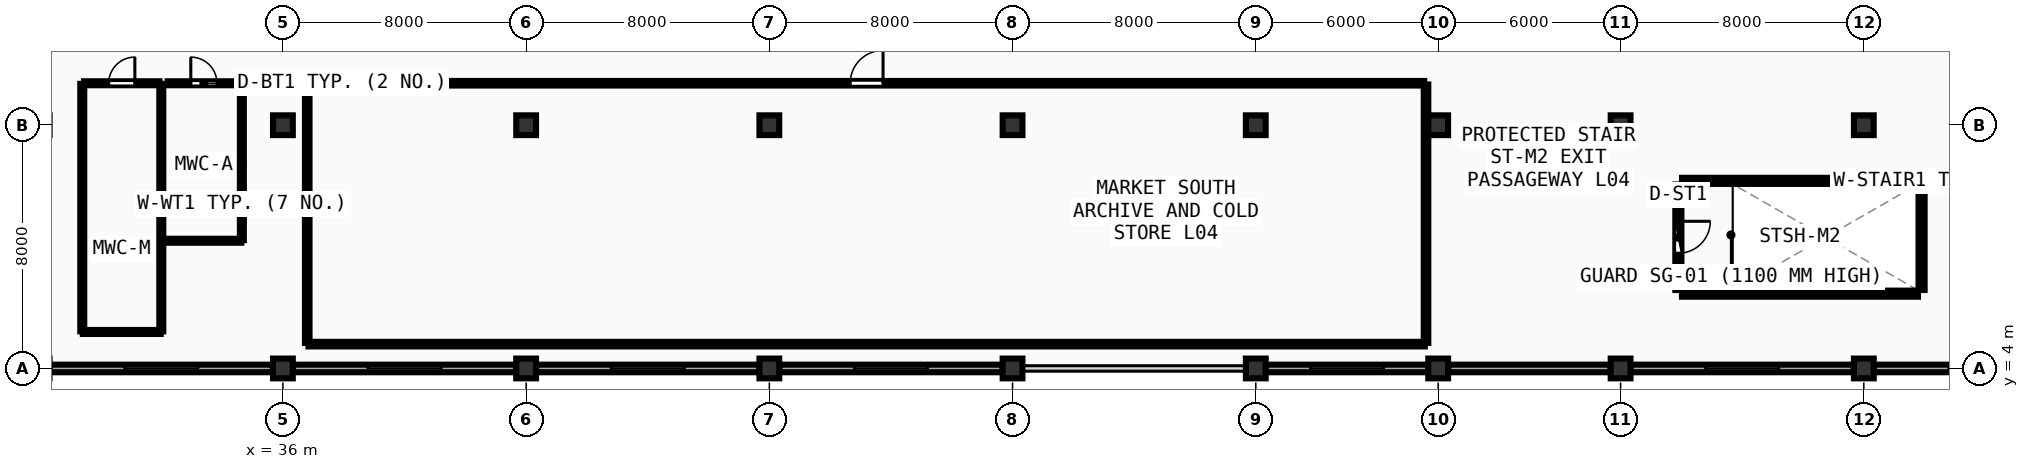
"""IFC4 building model, lengths in metres.
Left out: names, types, materials, properties, quantities, classifications, styles, units other than length and angle.
Written with IfcOpenShell. Run it as: python <this file> out.ifc"""

import sys

from ifc_helpers import new_model, si_unit, direction, frame, frame_2d, origin, origin_2d, place, context, subcontext, project, spatial, rectangle, extrude, element, fill, save


model = new_model("IFC4")
c1 = context("Model", 3, precision=1e-05, world=origin(), true_north=direction((0.0, 1.0)))
c2 = subcontext(c1, "Body", "Model", "MODEL_VIEW")
j1 = project(units=[si_unit("LENGTHUNIT", "METRE"), si_unit("PLANEANGLEUNIT", "RADIAN")], contexts=[c1])
p1 = place(None, origin())
s1 = spatial("IfcSite", under=j1, at=p1, CompositionType="ELEMENT")
p2 = place(p1, origin())
s2 = spatial("IfcBuilding", under=s1, at=p2, CompositionType="ELEMENT")
p3 = place(p2, frame((0.0, 0.0, 18.0)))
s3 = spatial("IfcBuildingStorey", under=s2, at=p3, CompositionType="ELEMENT", Elevation=18.0)
for number, where, z_axis, x_axis in (
    (1, (36.0, 4.0, 0.0), (0.0, 0.0, 1.0), (1.0, 0.0, 0.0)),
    (2, (36.0, 12.0, 0.0), (0.0, 0.0, 1.0), (1.0, 0.0, 0.0)),
    (3, (44.0, 4.0, 0.0), (0.0, 0.0, 1.0), (1.0, 0.0, 0.0)),
    (4, (44.0, 12.0, 0.0), (0.0, 0.0, 1.0), (1.0, 0.0, 0.0)),
    (5, (52.0, 4.0, 0.0), (0.0, 0.0, 1.0), (1.0, 0.0, 0.0)),
    (6, (52.0, 12.0, 0.0), (0.0, 0.0, 1.0), (1.0, 0.0, 0.0)),
    (7, (60.0, 4.0, 0.0), (0.0, 0.0, 1.0), (1.0, 0.0, 0.0)),
    (8, (60.0, 12.0, 0.0), (0.0, 0.0, 1.0), (1.0, 0.0, 0.0)),
    (9, (68.0, 4.0, 0.0), (0.0, 0.0, 1.0), (1.0, 0.0, 0.0)),
    (10, (68.0, 12.0, 0.0), (0.0, 0.0, 1.0), (1.0, 0.0, 0.0)),
    (11, (74.0, 4.0, 0.0), (0.0, 0.0, 1.0), (1.0, 0.0, 0.0)),
    (12, (74.0, 12.0, 0.0), (0.0, 0.0, 1.0), (1.0, 0.0, 0.0)),
    (13, (80.0, 4.0, 0.0), (0.0, 0.0, 1.0), (1.0, 0.0, 0.0)),
    (14, (80.0, 12.0, 0.0), (0.0, 0.0, 1.0), (1.0, 0.0, 0.0)),
    (15, (88.0, 4.0, 0.0), (0.0, 0.0, 1.0), (1.0, 0.0, 0.0)),
    (16, (88.0, 12.0, 0.0), (0.0, 0.0, 1.0), (1.0, 0.0, 0.0)),
):
    element("IfcColumn", number, at=place(p3, frame(where, z_axis=z_axis, x_axis=x_axis)), inside=s3, PredefinedType="COLUMN", context=c2, shape_type="SweptSolid", body=[
        extrude(rectangle(XDim=0.65, YDim=0.65, at=origin_2d()), origin(), (0.0, 0.0, 1.0), 4.5),
    ])
p4 = place(p3, frame((28.33, 4.0, 0.0), z_axis=(0.0, 0.0, 1.0), x_axis=(1.0, 0.0, 0.0)))
e17 = element("IfcWall", 17, at=p4, inside=s3, PredefinedType="SOLIDWALL", context=c2, shape_type="SweptSolid", body=[
    extrude(rectangle(XDim=7.34, YDim=0.25, at=frame_2d((3.67, 0.0))), origin(), (0.0, 0.0, 1.0), 3.44),
])
p5 = place(p4, frame((2.47, 0.0, 0.95)))
e18 = element("IfcOpeningElement", 18, at=p5, cuts=e17, PredefinedType="OPENING", context=c2, shape_type="SweptSolid", body=[
    extrude(rectangle(XDim=2.4, YDim=1.65, at=frame_2d((1.2, 0.825))), frame((0.0, 0.135, 0.0), z_axis=(0.0, -1.0, 0.0), x_axis=(1.0, 0.0, 0.0)), (0.0, 0.0, 1.0), 0.27),
])
p6 = place(p3, frame((36.33, 4.0, 0.0), z_axis=(0.0, 0.0, 1.0), x_axis=(1.0, 0.0, 0.0)))
e19 = element("IfcWall", 19, at=p6, inside=s3, PredefinedType="SOLIDWALL", context=c2, shape_type="SweptSolid", body=[
    extrude(rectangle(XDim=7.34, YDim=0.25, at=frame_2d((3.67, 0.0))), origin(), (0.0, 0.0, 1.0), 3.44),
])
p7 = place(p6, frame((2.47, 0.0, 0.95)))
e20 = element("IfcOpeningElement", 20, at=p7, cuts=e19, PredefinedType="OPENING", context=c2, shape_type="SweptSolid", body=[
    extrude(rectangle(XDim=2.4, YDim=1.65, at=frame_2d((1.2, 0.825))), frame((0.0, 0.135, 0.0), z_axis=(0.0, -1.0, 0.0), x_axis=(1.0, 0.0, 0.0)), (0.0, 0.0, 1.0), 0.27),
])
p8 = place(p3, frame((44.33, 4.0, 0.0), z_axis=(0.0, 0.0, 1.0), x_axis=(1.0, 0.0, 0.0)))
e21 = element("IfcWall", 21, at=p8, inside=s3, PredefinedType="SOLIDWALL", context=c2, shape_type="SweptSolid", body=[
    extrude(rectangle(XDim=7.34, YDim=0.25, at=frame_2d((3.67, 0.0))), origin(), (0.0, 0.0, 1.0), 3.44),
])
p9 = place(p8, frame((2.47, 0.0, 0.95)))
e22 = element("IfcOpeningElement", 22, at=p9, cuts=e21, PredefinedType="OPENING", context=c2, shape_type="SweptSolid", body=[
    extrude(rectangle(XDim=2.4, YDim=1.65, at=frame_2d((1.2, 0.825))), frame((0.0, 0.135, 0.0), z_axis=(0.0, -1.0, 0.0), x_axis=(1.0, 0.0, 0.0)), (0.0, 0.0, 1.0), 0.27),
])
p10 = place(p3, frame((52.33, 4.0, 0.0), z_axis=(0.0, 0.0, 1.0), x_axis=(1.0, 0.0, 0.0)))
e23 = element("IfcWall", 23, at=p10, inside=s3, PredefinedType="SOLIDWALL", context=c2, shape_type="SweptSolid", body=[
    extrude(rectangle(XDim=7.34, YDim=0.25, at=frame_2d((3.67, 0.0))), origin(), (0.0, 0.0, 1.0), 3.44),
])
p11 = place(p10, frame((2.47, 0.0, 0.95)))
e24 = element("IfcOpeningElement", 24, at=p11, cuts=e23, PredefinedType="OPENING", context=c2, shape_type="SweptSolid", body=[
    extrude(rectangle(XDim=2.4, YDim=1.65, at=frame_2d((1.2, 0.825))), frame((0.0, 0.135, 0.0), z_axis=(0.0, -1.0, 0.0), x_axis=(1.0, 0.0, 0.0)), (0.0, 0.0, 1.0), 0.27),
])
p12 = place(p3, frame((68.33, 4.0, 0.0), z_axis=(0.0, 0.0, 1.0), x_axis=(1.0, 0.0, 0.0)))
e25 = element("IfcWall", 25, at=p12, inside=s3, PredefinedType="SOLIDWALL", context=c2, shape_type="SweptSolid", body=[
    extrude(rectangle(XDim=5.34, YDim=0.25, at=frame_2d((2.67, 0.0))), origin(), (0.0, 0.0, 1.0), 3.44),
])
p13 = place(p12, frame((1.47, 0.0, 0.95)))
e26 = element("IfcOpeningElement", 26, at=p13, cuts=e25, PredefinedType="OPENING", context=c2, shape_type="SweptSolid", body=[
    extrude(rectangle(XDim=2.4, YDim=1.65, at=frame_2d((1.2, 0.825))), frame((0.0, 0.135, 0.0), z_axis=(0.0, -1.0, 0.0), x_axis=(1.0, 0.0, 0.0)), (0.0, 0.0, 1.0), 0.27),
])
p14 = place(p3, frame((74.33, 4.0, 0.0), z_axis=(0.0, 0.0, 1.0), x_axis=(1.0, 0.0, 0.0)))
e27 = element("IfcWall", 27, at=p14, inside=s3, PredefinedType="SOLIDWALL", context=c2, shape_type="SweptSolid", body=[
    extrude(rectangle(XDim=5.34, YDim=0.25, at=frame_2d((2.67, 0.0))), origin(), (0.0, 0.0, 1.0), 3.44),
])
p15 = place(p3, frame((80.33, 4.0, 0.0), z_axis=(0.0, 0.0, 1.0), x_axis=(1.0, 0.0, 0.0)))
e28 = element("IfcWall", 28, at=p15, inside=s3, PredefinedType="SOLIDWALL", context=c2, shape_type="SweptSolid", body=[
    extrude(rectangle(XDim=7.34, YDim=0.25, at=frame_2d((3.67, 0.0))), origin(), (0.0, 0.0, 1.0), 3.44),
])
p16 = place(p15, frame((2.47, 0.0, 0.95)))
e29 = element("IfcOpeningElement", 29, at=p16, cuts=e28, PredefinedType="OPENING", context=c2, shape_type="SweptSolid", body=[
    extrude(rectangle(XDim=2.4, YDim=1.65, at=frame_2d((1.2, 0.825))), frame((0.0, 0.135, 0.0), z_axis=(0.0, -1.0, 0.0), x_axis=(1.0, 0.0, 0.0)), (0.0, 0.0, 1.0), 0.27),
])
p17 = place(p3, frame((88.33, 4.0, 0.0), z_axis=(0.0, 0.0, 1.0), x_axis=(1.0, 0.0, 0.0)))
e30 = element("IfcWall", 30, at=p17, inside=s3, PredefinedType="SOLIDWALL", context=c2, shape_type="SweptSolid", body=[
    extrude(rectangle(XDim=7.34, YDim=0.25, at=frame_2d((3.67, 0.0))), origin(), (0.0, 0.0, 1.0), 3.44),
])
p18 = place(p17, frame((2.47, 0.0, 0.95)))
e31 = element("IfcOpeningElement", 31, at=p18, cuts=e30, PredefinedType="OPENING", context=c2, shape_type="SweptSolid", body=[
    extrude(rectangle(XDim=2.4, YDim=1.65, at=frame_2d((1.2, 0.825))), frame((0.0, 0.135, 0.0), z_axis=(0.0, -1.0, 0.0), x_axis=(1.0, 0.0, 0.0)), (0.0, 0.0, 1.0), 0.27),
])
p19 = place(p3, frame((82.02, 6.46, 0.0), z_axis=(0.0, 0.0, 1.0), x_axis=(1.0, 0.0, 0.0)))
e32 = element("IfcWall", 32, at=p19, inside=s3, PredefinedType="SHEAR", context=c2, shape_type="SweptSolid", body=[
    extrude(rectangle(XDim=7.76, YDim=0.2, at=frame_2d((3.88, 0.0))), origin(), (0.0, 0.0, 1.0), 4.26),
])
p20 = place(p3, frame((89.9, 6.58, 0.0), z_axis=(0.0, 0.0, 1.0), x_axis=(0.0, 1.0, 0.0)))
e33 = element("IfcWall", 33, at=p20, inside=s3, PredefinedType="SHEAR", context=c2, shape_type="SweptSolid", body=[
    extrude(rectangle(XDim=3.47, YDim=0.2, at=frame_2d((1.735, 0.0))), origin(), (0.0, 0.0, 1.0), 4.26),
])
p21 = place(p3, frame((89.78, 10.17, 0.0), z_axis=(0.0, 0.0, 1.0), x_axis=(-1.0, 0.0, 0.0)))
e34 = element("IfcWall", 34, at=p21, inside=s3, PredefinedType="SHEAR", context=c2, shape_type="SweptSolid", body=[
    extrude(rectangle(XDim=7.76, YDim=0.2, at=frame_2d((3.88, 0.0))), origin(), (0.0, 0.0, 1.0), 4.26),
])
p22 = place(p3, frame((81.9, 10.05, 0.0), z_axis=(0.0, 0.0, 1.0), x_axis=(0.0, -1.0, 0.0)))
e35 = element("IfcWall", 35, at=p22, inside=s3, PredefinedType="SHEAR", context=c2, shape_type="SweptSolid", body=[
    extrude(rectangle(XDim=3.47, YDim=0.2, at=frame_2d((1.735, 0.0))), origin(), (0.0, 0.0, 1.0), 4.26),
])
p23 = place(p22, frame((1.21, 0.0, 0.0)))
e36 = element("IfcOpeningElement", 36, at=p23, cuts=e35, PredefinedType="OPENING", context=c2, shape_type="SweptSolid", body=[
    extrude(rectangle(XDim=1.05, YDim=2.1, at=frame_2d((0.525, 1.05))), frame((0.0, 0.11, 0.0), z_axis=(0.0, -1.0, 0.0), x_axis=(1.0, 0.0, 0.0)), (0.0, 0.0, 1.0), 0.22),
])
p24 = place(p3, frame((29.46, 13.38, 0.0), z_axis=(0.0, 0.0, 1.0), x_axis=(1.0, 0.0, 0.0)))
e37 = element("IfcWall", 37, at=p24, inside=s3, PredefinedType="PLUMBINGWALL", context=c2, shape_type="SweptSolid", body=[
    extrude(rectangle(XDim=2.48, YDim=0.13, at=frame_2d((1.24, 0.0))), origin(), (0.0, 0.0, 1.0), 4.23),
])
p25 = place(p24, frame((0.81, 0.0, 0.0)))
e38 = element("IfcOpeningElement", 38, at=p25, cuts=e37, PredefinedType="OPENING", context=c2, shape_type="SweptSolid", body=[
    extrude(rectangle(XDim=0.86, YDim=2.05, at=frame_2d((0.43, 1.025))), frame((0.0, 0.075, 0.0), z_axis=(0.0, -1.0, 0.0), x_axis=(1.0, 0.0, 0.0)), (0.0, 0.0, 1.0), 0.15),
])
p26 = place(p3, frame((32.21, 13.38, 0.0), z_axis=(0.0, 0.0, 1.0), x_axis=(1.0, 0.0, 0.0)))
e39 = element("IfcWall", 39, at=p26, inside=s3, PredefinedType="PLUMBINGWALL", context=c2, shape_type="SweptSolid", body=[
    extrude(rectangle(XDim=2.38, YDim=0.13, at=frame_2d((1.19, 0.0))), origin(), (0.0, 0.0, 1.0), 4.23),
])
p27 = place(p26, frame((0.76, 0.0, 0.0)))
e40 = element("IfcOpeningElement", 40, at=p27, cuts=e39, PredefinedType="OPENING", context=c2, shape_type="SweptSolid", body=[
    extrude(rectangle(XDim=0.86, YDim=2.05, at=frame_2d((0.43, 1.025))), frame((0.0, 0.075, 0.0), z_axis=(0.0, -1.0, 0.0), x_axis=(1.0, 0.0, 0.0)), (0.0, 0.0, 1.0), 0.15),
])
p28 = place(p3, frame((36.86, 13.38, 0.0), z_axis=(0.0, 0.0, 1.0), x_axis=(1.0, 0.0, 0.0)))
e41 = element("IfcWall", 41, at=p28, inside=s3, PredefinedType="PARTITIONING", context=c2, shape_type="SweptSolid", body=[
    extrude(rectangle(XDim=36.68, YDim=0.15, at=frame_2d((18.34, 0.0))), origin(), (0.0, 0.0, 1.0), 3.445),
])
p29 = place(p28, frame((17.8, 0.0, 0.0)))
e42 = element("IfcOpeningElement", 42, at=p29, cuts=e41, PredefinedType="OPENING", context=c2, shape_type="SweptSolid", body=[
    extrude(rectangle(XDim=1.08, YDim=2.1, at=frame_2d((0.54, 1.05))), frame((0.0, 0.085, 0.0), z_axis=(0.0, -1.0, 0.0), x_axis=(1.0, 0.0, 0.0)), (0.0, 0.0, 1.0), 0.17),
])
p30 = place(p3, frame((29.42, 5.2, 0.0), z_axis=(0.0, 0.0, 1.0), x_axis=(1.0, 0.0, 0.0)))
e43 = element("IfcWall", 43, at=p30, inside=s3, PredefinedType="PLUMBINGWALL", context=c2, shape_type="SweptSolid", body=[
    extrude(rectangle(XDim=2.56, YDim=0.13, at=frame_2d((1.28, 0.0))), origin(), (0.0, 0.0, 1.0), 4.23),
])
for number, where, z_axis, x_axis in (
    (44, (32.0, 5.22, 0.0), (0.0, 0.0, 1.0), (0.0, 1.0, 0.0)),
    (45, (29.4, 13.36, 0.0), (0.0, 0.0, 1.0), (0.0, -1.0, 0.0)),
):
    element("IfcWall", number, at=place(p3, frame(where, z_axis=z_axis, x_axis=x_axis)), inside=s3, PredefinedType="PLUMBINGWALL", context=c2, shape_type="SweptSolid", body=[
        extrude(rectangle(XDim=8.14, YDim=0.13, at=frame_2d((4.07, 0.0))), origin(), (0.0, 0.0, 1.0), 3.445),
    ])
p31 = place(p3, frame((32.17, 8.2, 0.0), z_axis=(0.0, 0.0, 1.0), x_axis=(1.0, 0.0, 0.0)))
e46 = element("IfcWall", 46, at=p31, inside=s3, PredefinedType="PLUMBINGWALL", context=c2, shape_type="SweptSolid", body=[
    extrude(rectangle(XDim=2.46, YDim=0.13, at=frame_2d((1.23, 0.0))), origin(), (0.0, 0.0, 1.0), 4.23),
])
p32 = place(p3, frame((34.65, 8.22, 0.0), z_axis=(0.0, 0.0, 1.0), x_axis=(0.0, 1.0, 0.0)))
e47 = element("IfcWall", 47, at=p32, inside=s3, PredefinedType="PLUMBINGWALL", context=c2, shape_type="SweptSolid", body=[
    extrude(rectangle(XDim=5.14, YDim=0.13, at=frame_2d((2.57, 0.0))), origin(), (0.0, 0.0, 1.0), 3.445),
])
p33 = place(p3, frame((36.84, 4.8, 0.0), z_axis=(0.0, 0.0, 1.0), x_axis=(1.0, 0.0, 0.0)))
e48 = element("IfcWall", 48, at=p33, inside=s3, PredefinedType="PARTITIONING", context=c2, shape_type="SweptSolid", body=[
    extrude(rectangle(XDim=36.72, YDim=0.15, at=frame_2d((18.36, 0.0))), origin(), (0.0, 0.0, 1.0), 3.445),
])
for number, where, z_axis, x_axis in (
    (49, (73.6, 4.84, 0.0), (0.0, 0.0, 1.0), (0.0, 1.0, 0.0)),
    (50, (36.8, 13.34, 0.0), (0.0, 0.0, 1.0), (0.0, -1.0, 0.0)),
):
    element("IfcWall", number, at=place(p3, frame(where, z_axis=z_axis, x_axis=x_axis)), inside=s3, PredefinedType="PARTITIONING", context=c2, shape_type="SweptSolid", body=[
        extrude(rectangle(XDim=8.5, YDim=0.15, at=frame_2d((4.25, 0.0))), origin(), (0.0, 0.0, 1.0), 3.445),
    ])
p34 = place(p5, origin())
e51 = element("IfcWindow", 51, at=p34, inside=s3, PartitioningType="SINGLE_PANEL", PredefinedType="WINDOW", context=c2, shape_type="SweptSolid", body=[
    extrude(rectangle(XDim=2.4, YDim=1.65, at=frame_2d((1.2, 0.825))), frame((0.0, 0.03, 0.0), z_axis=(0.0, -1.0, 0.0), x_axis=(1.0, 0.0, 0.0)), (0.0, 0.0, 1.0), 0.06),
])
fill(e18, e51)
p35 = place(p7, origin())
e52 = element("IfcWindow", 52, at=p35, inside=s3, PartitioningType="SINGLE_PANEL", PredefinedType="WINDOW", context=c2, shape_type="SweptSolid", body=[
    extrude(rectangle(XDim=2.4, YDim=1.65, at=frame_2d((1.2, 0.825))), frame((0.0, 0.03, 0.0), z_axis=(0.0, -1.0, 0.0), x_axis=(1.0, 0.0, 0.0)), (0.0, 0.0, 1.0), 0.06),
])
fill(e20, e52)
p36 = place(p9, origin())
e53 = element("IfcWindow", 53, at=p36, inside=s3, PartitioningType="SINGLE_PANEL", PredefinedType="WINDOW", context=c2, shape_type="SweptSolid", body=[
    extrude(rectangle(XDim=2.4, YDim=1.65, at=frame_2d((1.2, 0.825))), frame((0.0, 0.03, 0.0), z_axis=(0.0, -1.0, 0.0), x_axis=(1.0, 0.0, 0.0)), (0.0, 0.0, 1.0), 0.06),
])
fill(e22, e53)
p37 = place(p11, origin())
e54 = element("IfcWindow", 54, at=p37, inside=s3, PartitioningType="SINGLE_PANEL", PredefinedType="WINDOW", context=c2, shape_type="SweptSolid", body=[
    extrude(rectangle(XDim=2.4, YDim=1.65, at=frame_2d((1.2, 0.825))), frame((0.0, 0.03, 0.0), z_axis=(0.0, -1.0, 0.0), x_axis=(1.0, 0.0, 0.0)), (0.0, 0.0, 1.0), 0.06),
])
fill(e24, e54)
p38 = place(p13, origin())
e55 = element("IfcWindow", 55, at=p38, inside=s3, PartitioningType="SINGLE_PANEL", PredefinedType="WINDOW", context=c2, shape_type="SweptSolid", body=[
    extrude(rectangle(XDim=2.4, YDim=1.65, at=frame_2d((1.2, 0.825))), frame((0.0, 0.03, 0.0), z_axis=(0.0, -1.0, 0.0), x_axis=(1.0, 0.0, 0.0)), (0.0, 0.0, 1.0), 0.06),
])
fill(e26, e55)
p39 = place(p16, origin())
e56 = element("IfcWindow", 56, at=p39, inside=s3, PartitioningType="SINGLE_PANEL", PredefinedType="WINDOW", context=c2, shape_type="SweptSolid", body=[
    extrude(rectangle(XDim=2.4, YDim=1.65, at=frame_2d((1.2, 0.825))), frame((0.0, 0.03, 0.0), z_axis=(0.0, -1.0, 0.0), x_axis=(1.0, 0.0, 0.0)), (0.0, 0.0, 1.0), 0.06),
])
fill(e29, e56)
p40 = place(p23, origin())
e57 = element("IfcDoor", 57, at=p40, inside=s3, OperationType="SINGLE_SWING_LEFT", PredefinedType="DOOR", context=c2, shape_type="SweptSolid", body=[
    extrude(rectangle(XDim=1.05, YDim=2.1, at=frame_2d((0.525, 1.05))), frame((0.0, 0.025, 0.0), z_axis=(0.0, -1.0, 0.0), x_axis=(1.0, 0.0, 0.0)), (0.0, 0.0, 1.0), 0.05),
])
fill(e36, e57)
p41 = place(p25, origin())
e58 = element("IfcDoor", 58, at=p41, inside=s3, OperationType="SINGLE_SWING_RIGHT", PredefinedType="DOOR", context=c2, shape_type="SweptSolid", body=[
    extrude(rectangle(XDim=0.86, YDim=2.05, at=frame_2d((0.43, 1.025))), frame((0.0, 0.025, 0.0), z_axis=(0.0, -1.0, 0.0), x_axis=(1.0, 0.0, 0.0)), (0.0, 0.0, 1.0), 0.05),
])
fill(e38, e58)
p42 = place(p27, origin())
e59 = element("IfcDoor", 59, at=p42, inside=s3, OperationType="SINGLE_SWING_LEFT", PredefinedType="DOOR", context=c2, shape_type="SweptSolid", body=[
    extrude(rectangle(XDim=0.86, YDim=2.05, at=frame_2d((0.43, 1.025))), frame((0.0, 0.025, 0.0), z_axis=(0.0, -1.0, 0.0), x_axis=(1.0, 0.0, 0.0)), (0.0, 0.0, 1.0), 0.05),
])
fill(e40, e59)
p43 = place(p29, origin())
e60 = element("IfcDoor", 60, at=p43, inside=s3, OperationType="SINGLE_SWING_RIGHT", PredefinedType="DOOR", context=c2, shape_type="SweptSolid", body=[
    extrude(rectangle(XDim=1.08, YDim=2.1, at=frame_2d((0.54, 1.05))), frame((0.0, 0.025, 0.0), z_axis=(0.0, -1.0, 0.0), x_axis=(1.0, 0.0, 0.0)), (0.0, 0.0, 1.0), 0.05),
])
fill(e42, e60)
save(model, sys.argv[1])
